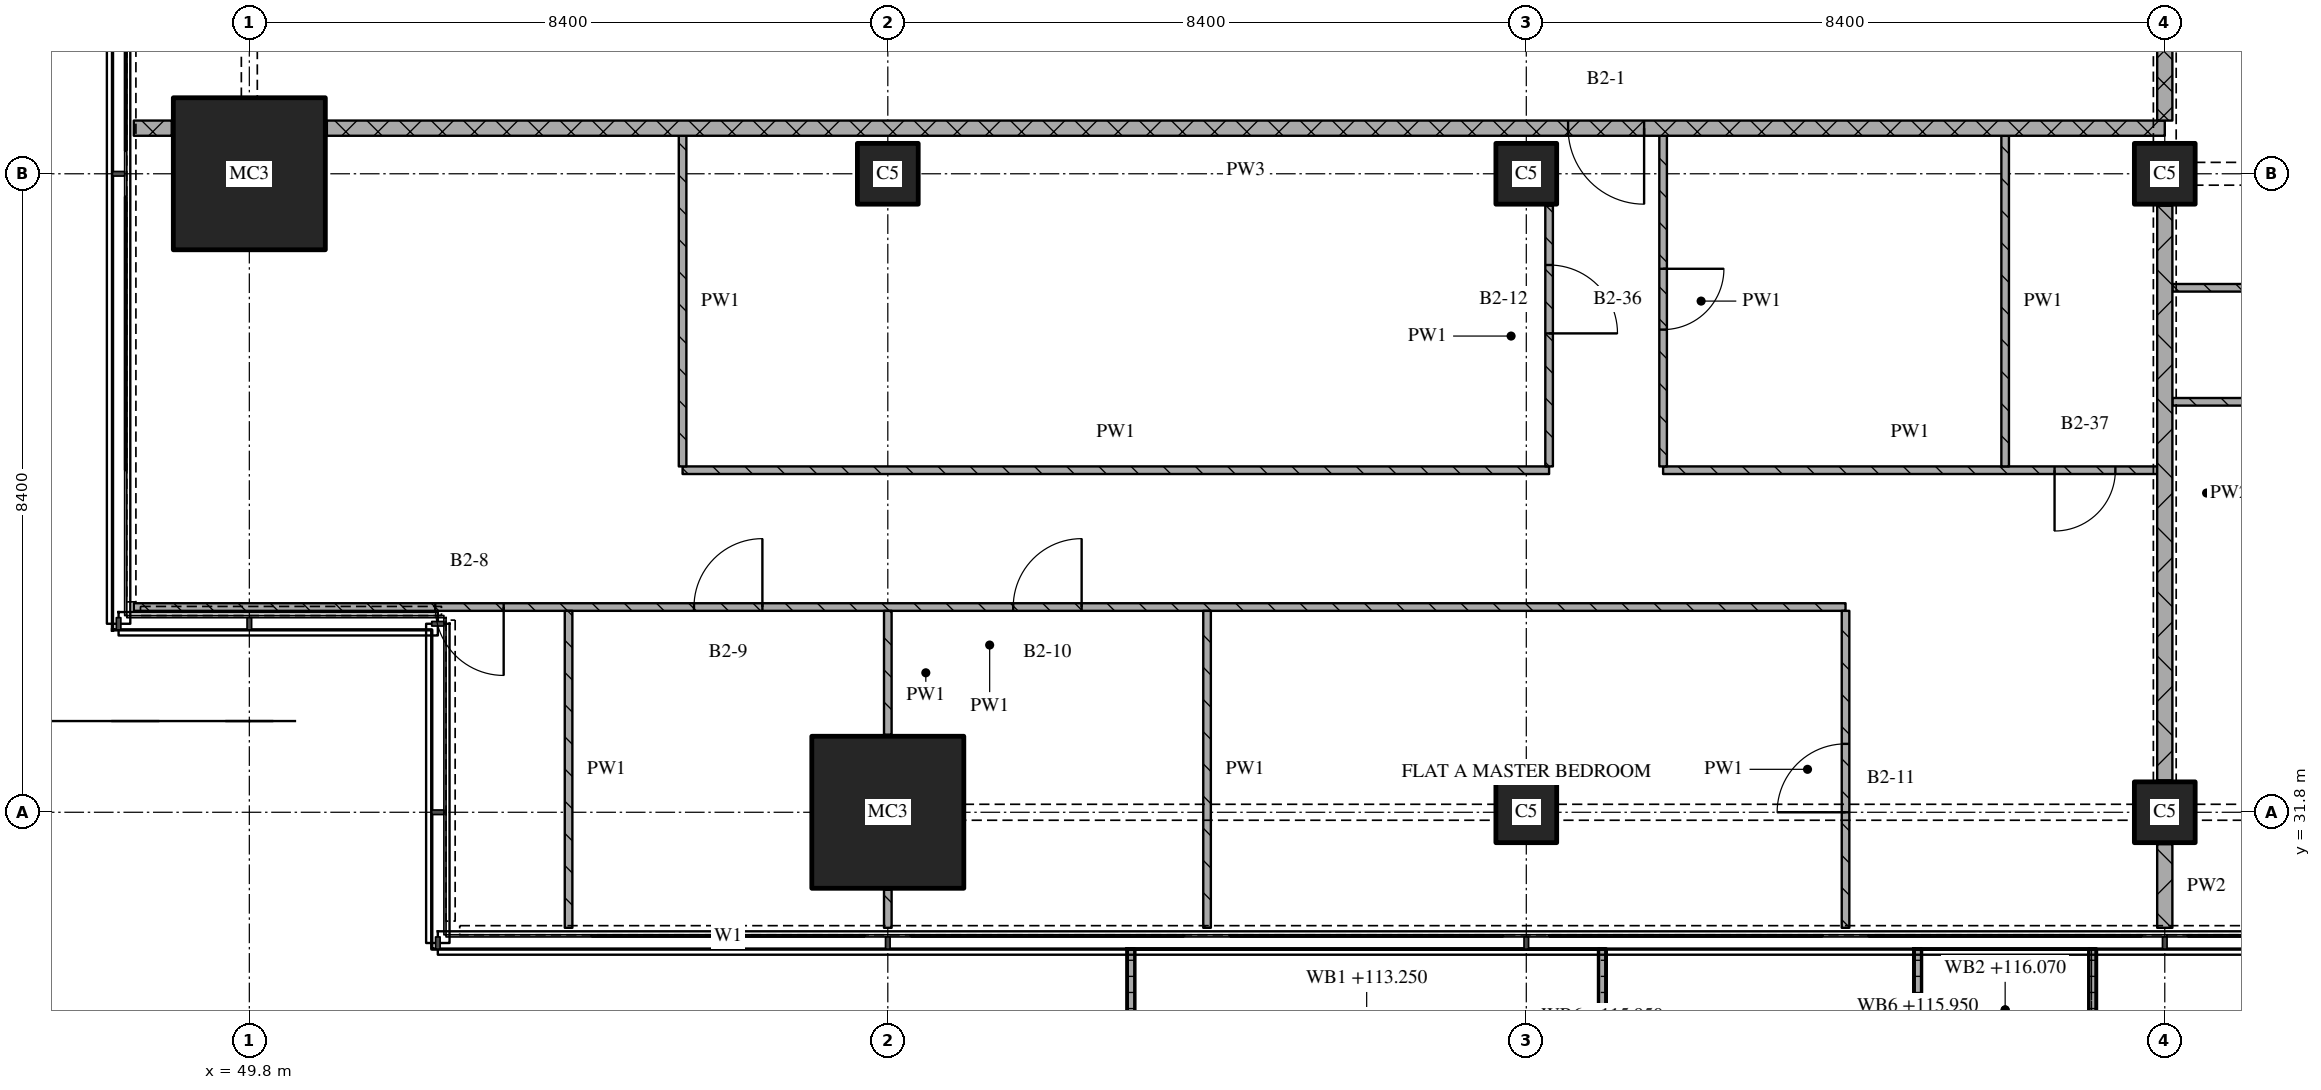
"""IFC4 building model, lengths in metres.
Left out: names, types, materials, properties, quantities, classifications, styles, units other than length and angle.
Written with IfcOpenShell. Run it as: python <this file> out.ifc"""

import sys

from ifc_helpers import new_model, si_unit, direction, frame, frame_2d, origin, origin_2d, place, context, subcontext, project, spatial, polyline, rectangle, outline, extrude, element, fill, save


model = new_model("IFC4")
c1 = context("Model", 3, precision=1e-05, world=origin(), true_north=direction((0.0, 1.0)))
c2 = subcontext(c1, "Body", "Model", "MODEL_VIEW")
j1 = project(units=[si_unit("LENGTHUNIT", "METRE"), si_unit("PLANEANGLEUNIT", "RADIAN")], contexts=[c1])
p1 = place(None, origin())
s1 = spatial("IfcSite", under=j1, at=p1, CompositionType="ELEMENT")
p2 = place(p1, origin())
s2 = spatial("IfcBuilding", under=s1, at=p2, CompositionType="ELEMENT")
p3 = place(p2, frame((0.0, 0.0, 113.25)))
s3 = spatial("IfcBuildingStorey", under=s2, at=p3, CompositionType="ELEMENT", Elevation=113.25)
for number, where, z_axis, x_axis in (
    (1, (49.8, 40.2, 0.0), (0.0, 0.0, 1.0), (1.0, 0.0, 0.0)),
    (2, (58.2, 31.8, 0.0), (0.0, 0.0, 1.0), (1.0, 0.0, 0.0)),
):
    element("IfcColumn", number, at=place(p3, frame(where, z_axis=z_axis, x_axis=x_axis)), inside=s3, PredefinedType="COLUMN", context=c2, shape_type="SweptSolid", body=[
        extrude(rectangle(XDim=2.0, YDim=2.0, at=origin_2d()), origin(), (0.0, 0.0, 1.0), 3.6),
    ])
for number, where, z_axis, x_axis in (
    (3, (58.2, 40.2, 0.0), (0.0, 0.0, 1.0), (1.0, 0.0, 0.0)),
    (4, (66.6, 31.8, 0.0), (0.0, 0.0, 1.0), (1.0, 0.0, 0.0)),
    (5, (66.6, 40.2, 0.0), (0.0, 0.0, 1.0), (1.0, 0.0, 0.0)),
    (6, (75.0, 31.8, 0.0), (0.0, 0.0, 1.0), (1.0, 0.0, 0.0)),
    (7, (75.0, 40.2, 0.0), (0.0, 0.0, 1.0), (1.0, 0.0, 0.0)),
):
    element("IfcColumn", number, at=place(p3, frame(where, z_axis=z_axis, x_axis=x_axis)), inside=s3, PredefinedType="COLUMN", context=c2, shape_type="SweptSolid", body=[
        extrude(rectangle(XDim=0.8, YDim=0.8, at=origin_2d()), origin(), (0.0, 0.0, 1.0), 3.6),
    ])
p4 = place(p3, origin())
e8 = element("IfcWall", 8, at=p4, inside=s3, PredefinedType="SOLIDWALL", context=c2, shape_type="SweptSolid", body=[
    extrude(outline(polyline([(61.35, 30.0), (61.45, 30.0), (61.45, 28.233), (67.55, 28.233), (67.55, 30.0), (67.65, 30.0), (67.65, 28.133), (61.35, 28.133), (61.35, 30.0)])), origin(), (0.0, 0.0, 1.0), 1.0),
])
p5 = place(p3, origin())
e9 = element("IfcWall", 9, at=p5, inside=s3, PredefinedType="SOLIDWALL", context=c2, shape_type="SweptSolid", body=[
    extrude(outline(polyline([(71.7, 30.0), (71.8, 30.0), (71.8, 28.5), (74.0, 28.5), (74.0, 30.0), (74.1, 30.0), (74.1, 28.4), (71.7, 28.4), (71.7, 30.0)])), origin(), (0.0, 0.0, 1.0), 1.0),
])
p6 = place(p3, frame((70.8, 34.5, 0.0), z_axis=(0.0, 0.0, 1.0), x_axis=(-1.0, 0.0, 0.0)))
e10 = element("IfcWall", 10, at=p6, inside=s3, PredefinedType="PARTITIONING", context=c2, shape_type="SweptSolid", body=[
    extrude(rectangle(XDim=22.52, YDim=0.1, at=frame_2d((11.26, 0.0))), origin(), (0.0, 0.0, 1.0), 3.32),
])
p7 = place(p6, frame((10.05, 0.0, 0.0)))
e11 = element("IfcOpeningElement", 11, at=p7, cuts=e10, PredefinedType="OPENING", context=c2, shape_type="SweptSolid", body=[
    extrude(rectangle(XDim=0.9, YDim=2.1, at=frame_2d((0.45, 1.05))), frame((0.0, 0.06, 0.0), z_axis=(0.0, -1.0, 0.0), x_axis=(1.0, 0.0, 0.0)), (0.0, 0.0, 1.0), 0.12),
])
p8 = place(p6, frame((14.25, 0.0, 0.0)))
e12 = element("IfcOpeningElement", 12, at=p8, cuts=e10, PredefinedType="OPENING", context=c2, shape_type="SweptSolid", body=[
    extrude(rectangle(XDim=0.9, YDim=2.1, at=frame_2d((0.45, 1.05))), frame((0.0, 0.06, 0.0), z_axis=(0.0, -1.0, 0.0), x_axis=(1.0, 0.0, 0.0)), (0.0, 0.0, 1.0), 0.12),
])
p9 = place(p6, frame((17.654, 0.0, 0.0)))
e13 = element("IfcOpeningElement", 13, at=p9, cuts=e10, PredefinedType="OPENING", context=c2, shape_type="SweptSolid", body=[
    extrude(rectangle(XDim=0.9, YDim=2.1, at=frame_2d((0.45, 1.05))), frame((0.0, 0.06, 0.0), z_axis=(0.0, -1.0, 0.0), x_axis=(1.0, 0.0, 0.0)), (0.0, 0.0, 1.0), 0.12),
])
p10 = place(p3, frame((55.5, 36.3, 0.0), z_axis=(0.0, 0.0, 1.0), x_axis=(1.0, 0.0, 0.0)))
e14 = element("IfcWall", 14, at=p10, inside=s3, PredefinedType="PARTITIONING", context=c2, shape_type="SweptSolid", body=[
    extrude(rectangle(XDim=11.4, YDim=0.1, at=frame_2d((5.7, 0.0))), origin(), (0.0, 0.0, 1.0), 3.32),
])
p11 = place(p3, frame((68.4, 36.3, 0.0), z_axis=(0.0, 0.0, 1.0), x_axis=(1.0, 0.0, 0.0)))
e15 = element("IfcWall", 15, at=p11, inside=s3, PredefinedType="PARTITIONING", context=c2, shape_type="SweptSolid", body=[
    extrude(rectangle(XDim=6.5, YDim=0.1, at=frame_2d((3.25, 0.0))), origin(), (0.0, 0.0, 1.0), 3.32),
])
p12 = place(p11, frame((5.15, 0.0, 0.0)))
e16 = element("IfcOpeningElement", 16, at=p12, cuts=e15, PredefinedType="OPENING", context=c2, shape_type="SweptSolid", body=[
    extrude(rectangle(XDim=0.8, YDim=2.1, at=frame_2d((0.4, 1.05))), frame((0.0, 0.06, 0.0), z_axis=(0.0, -1.0, 0.0), x_axis=(1.0, 0.0, 0.0)), (0.0, 0.0, 1.0), 0.12),
])
p13 = place(p3, frame((75.1, 37.2, 0.0), z_axis=(0.0, 0.0, 1.0), x_axis=(1.0, 0.0, 0.0)))
e17 = element("IfcWall", 17, at=p13, inside=s3, PredefinedType="PARTITIONING", context=c2, shape_type="SweptSolid", body=[
    extrude(rectangle(XDim=8.3, YDim=0.1, at=frame_2d((4.15, 0.0))), origin(), (0.0, 0.0, 1.0), 3.32),
])
p14 = place(p3, frame((75.1, 38.7, 0.0), z_axis=(0.0, 0.0, 1.0), x_axis=(1.0, 0.0, 0.0)))
e18 = element("IfcWall", 18, at=p14, inside=s3, PredefinedType="PARTITIONING", context=c2, shape_type="SweptSolid", body=[
    extrude(rectangle(XDim=11.0, YDim=0.1, at=frame_2d((5.5, 0.0))), origin(), (0.0, 0.0, 1.0), 3.32),
])
p15 = place(p14, frame((1.75, 0.0, 0.0)))
e19 = element("IfcOpeningElement", 19, at=p15, cuts=e18, PredefinedType="OPENING", context=c2, shape_type="SweptSolid", body=[
    extrude(rectangle(XDim=0.8, YDim=2.1, at=frame_2d((0.4, 1.05))), frame((0.0, 0.06, 0.0), z_axis=(0.0, -1.0, 0.0), x_axis=(1.0, 0.0, 0.0)), (0.0, 0.0, 1.0), 0.12),
])
p16 = place(p14, frame((6.25, 0.0, 0.0)))
e20 = element("IfcOpeningElement", 20, at=p16, cuts=e18, PredefinedType="OPENING", context=c2, shape_type="SweptSolid", body=[
    extrude(rectangle(XDim=0.8, YDim=2.1, at=frame_2d((0.4, 1.05))), frame((0.0, 0.06, 0.0), z_axis=(0.0, -1.0, 0.0), x_axis=(1.0, 0.0, 0.0)), (0.0, 0.0, 1.0), 0.12),
])
p17 = place(p3, frame((48.28, 40.8, 0.0), z_axis=(0.0, 0.0, 1.0), x_axis=(1.0, 0.0, 0.0)))
e21 = element("IfcWall", 21, at=p17, inside=s3, PredefinedType="PARTITIONING", context=c2, shape_type="SweptSolid", body=[
    extrude(rectangle(XDim=0.5, YDim=0.2, at=frame_2d((0.25, 0.0))), origin(), (0.0, 0.0, 1.0), 3.32),
])
p18 = place(p3, frame((75.0, 40.8, 0.0), z_axis=(0.0, 0.0, 1.0), x_axis=(-1.0, 0.0, 0.0)))
e22 = element("IfcWall", 22, at=p18, inside=s3, PredefinedType="PARTITIONING", context=c2, shape_type="SweptSolid", body=[
    extrude(rectangle(XDim=24.18, YDim=0.2, at=frame_2d((12.09, 0.0))), origin(), (0.0, 0.0, 1.0), 3.32),
])
p19 = place(p18, frame((6.85, 0.0, 0.0)))
e23 = element("IfcOpeningElement", 23, at=p19, cuts=e22, PredefinedType="OPENING", context=c2, shape_type="SweptSolid", body=[
    extrude(rectangle(XDim=1.0, YDim=2.1, at=frame_2d((0.5, 1.05))), frame((0.0, 0.11, 0.0), z_axis=(0.0, -1.0, 0.0), x_axis=(1.0, 0.0, 0.0)), (0.0, 0.0, 1.0), 0.22),
])
p20 = place(p3, frame((54.0, 34.45, 0.0), z_axis=(0.0, 0.0, 1.0), x_axis=(0.0, -1.0, 0.0)))
e24 = element("IfcWall", 24, at=p20, inside=s3, PredefinedType="PARTITIONING", context=c2, shape_type="SweptSolid", body=[
    extrude(rectangle(XDim=4.17, YDim=0.1, at=frame_2d((2.085, 0.0))), origin(), (0.0, 0.0, 1.0), 3.32),
])
p21 = place(p3, frame((55.5, 40.7, 0.0), z_axis=(0.0, 0.0, 1.0), x_axis=(0.0, -1.0, 0.0)))
e25 = element("IfcWall", 25, at=p21, inside=s3, PredefinedType="PARTITIONING", context=c2, shape_type="SweptSolid", body=[
    extrude(rectangle(XDim=4.35, YDim=0.1, at=frame_2d((2.175, 0.0))), origin(), (0.0, 0.0, 1.0), 3.32),
])
p22 = place(p3, frame((58.2, 30.78, 0.0), z_axis=(0.0, 0.0, 1.0), x_axis=(0.0, -1.0, 0.0)))
e26 = element("IfcWall", 26, at=p22, inside=s3, PredefinedType="PARTITIONING", context=c2, shape_type="SweptSolid", body=[
    extrude(rectangle(XDim=0.5, YDim=0.1, at=frame_2d((0.25, 0.0))), origin(), (0.0, 0.0, 1.0), 3.32),
])
p23 = place(p3, frame((58.2, 34.45, 0.0), z_axis=(0.0, 0.0, 1.0), x_axis=(0.0, -1.0, 0.0)))
e27 = element("IfcWall", 27, at=p23, inside=s3, PredefinedType="PARTITIONING", context=c2, shape_type="SweptSolid", body=[
    extrude(rectangle(XDim=1.63, YDim=0.1, at=frame_2d((0.815, 0.0))), origin(), (0.0, 0.0, 1.0), 3.32),
])
p24 = place(p3, frame((62.4, 34.45, 0.0), z_axis=(0.0, 0.0, 1.0), x_axis=(0.0, -1.0, 0.0)))
e28 = element("IfcWall", 28, at=p24, inside=s3, PredefinedType="PARTITIONING", context=c2, shape_type="SweptSolid", body=[
    extrude(rectangle(XDim=4.17, YDim=0.1, at=frame_2d((2.085, 0.0))), origin(), (0.0, 0.0, 1.0), 3.32),
])
p25 = place(p3, frame((66.9, 36.35, 0.0), z_axis=(0.0, 0.0, 1.0), x_axis=(0.0, 1.0, 0.0)))
e29 = element("IfcWall", 29, at=p25, inside=s3, PredefinedType="PARTITIONING", context=c2, shape_type="SweptSolid", body=[
    extrude(rectangle(XDim=3.43, YDim=0.1, at=frame_2d((1.715, 0.0))), origin(), (0.0, 0.0, 1.0), 3.32),
])
p26 = place(p25, frame((1.75, 0.0, 0.0)))
e30 = element("IfcOpeningElement", 30, at=p26, cuts=e29, PredefinedType="OPENING", context=c2, shape_type="SweptSolid", body=[
    extrude(rectangle(XDim=0.9, YDim=2.1, at=frame_2d((0.45, 1.05))), frame((0.0, 0.06, 0.0), z_axis=(0.0, -1.0, 0.0), x_axis=(1.0, 0.0, 0.0)), (0.0, 0.0, 1.0), 0.12),
])
p27 = place(p3, frame((68.4, 40.7, 0.0), z_axis=(0.0, 0.0, 1.0), x_axis=(0.0, -1.0, 0.0)))
e31 = element("IfcWall", 31, at=p27, inside=s3, PredefinedType="PARTITIONING", context=c2, shape_type="SweptSolid", body=[
    extrude(rectangle(XDim=4.35, YDim=0.1, at=frame_2d((2.175, 0.0))), origin(), (0.0, 0.0, 1.0), 3.32),
])
p28 = place(p27, frame((1.75, 0.0, 0.0)))
e32 = element("IfcOpeningElement", 32, at=p28, cuts=e31, PredefinedType="OPENING", context=c2, shape_type="SweptSolid", body=[
    extrude(rectangle(XDim=0.8, YDim=2.1, at=frame_2d((0.4, 1.05))), frame((0.0, 0.06, 0.0), z_axis=(0.0, -1.0, 0.0), x_axis=(1.0, 0.0, 0.0)), (0.0, 0.0, 1.0), 0.12),
])
p29 = place(p3, frame((70.8, 30.28, 0.0), z_axis=(0.0, 0.0, 1.0), x_axis=(0.0, 1.0, 0.0)))
e33 = element("IfcWall", 33, at=p29, inside=s3, PredefinedType="PARTITIONING", context=c2, shape_type="SweptSolid", body=[
    extrude(rectangle(XDim=4.17, YDim=0.1, at=frame_2d((2.085, 0.0))), origin(), (0.0, 0.0, 1.0), 3.32),
])
p30 = place(p29, frame((1.52, 0.0, 0.0)))
e34 = element("IfcOpeningElement", 34, at=p30, cuts=e33, PredefinedType="OPENING", context=c2, shape_type="SweptSolid", body=[
    extrude(rectangle(XDim=0.9, YDim=2.1, at=frame_2d((0.45, 1.05))), frame((0.0, 0.06, 0.0), z_axis=(0.0, -1.0, 0.0), x_axis=(1.0, 0.0, 0.0)), (0.0, 0.0, 1.0), 0.12),
])
p31 = place(p3, frame((72.9, 40.7, 0.0), z_axis=(0.0, 0.0, 1.0), x_axis=(0.0, -1.0, 0.0)))
e35 = element("IfcWall", 35, at=p31, inside=s3, PredefinedType="PARTITIONING", context=c2, shape_type="SweptSolid", body=[
    extrude(rectangle(XDim=4.35, YDim=0.1, at=frame_2d((2.175, 0.0))), origin(), (0.0, 0.0, 1.0), 3.32),
])
p32 = place(p3, frame((75.0, 43.1, 0.0), z_axis=(0.0, 0.0, 1.0), x_axis=(0.0, -1.0, 0.0)))
e36 = element("IfcWall", 36, at=p32, inside=s3, PredefinedType="PARTITIONING", context=c2, shape_type="SweptSolid", body=[
    extrude(rectangle(XDim=2.2, YDim=0.2, at=frame_2d((1.1, 0.0))), origin(), (0.0, 0.0, 1.0), 2.43),
])
p33 = place(p3, frame((75.0, 31.38, 0.0), z_axis=(0.0, 0.0, 1.0), x_axis=(0.0, -1.0, 0.0)))
e37 = element("IfcWall", 37, at=p33, inside=s3, PredefinedType="PARTITIONING", context=c2, shape_type="SweptSolid", body=[
    extrude(rectangle(XDim=1.1, YDim=0.2, at=frame_2d((0.55, 0.0))), origin(), (0.0, 0.0, 1.0), 3.32),
])
p34 = place(p3, frame((75.0, 39.78, 0.0), z_axis=(0.0, 0.0, 1.0), x_axis=(0.0, -1.0, 0.0)))
e38 = element("IfcWall", 38, at=p34, inside=s3, PredefinedType="PARTITIONING", context=c2, shape_type="SweptSolid", body=[
    extrude(rectangle(XDim=7.56, YDim=0.2, at=frame_2d((3.78, 0.0))), origin(), (0.0, 0.0, 1.0), 2.83),
])
p35 = place(p7, origin())
e39 = element("IfcDoor", 39, at=p35, inside=s3, OperationType="SINGLE_SWING_RIGHT", PredefinedType="DOOR", context=c2, shape_type="SweptSolid", body=[
    extrude(rectangle(XDim=0.9, YDim=2.1, at=frame_2d((0.45, 1.05))), frame((0.0, 0.025, 0.0), z_axis=(0.0, -1.0, 0.0), x_axis=(1.0, 0.0, 0.0)), (0.0, 0.0, 1.0), 0.05),
])
fill(e11, e39)
p36 = place(p8, origin())
e40 = element("IfcDoor", 40, at=p36, inside=s3, OperationType="SINGLE_SWING_RIGHT", PredefinedType="DOOR", context=c2, shape_type="SweptSolid", body=[
    extrude(rectangle(XDim=0.9, YDim=2.1, at=frame_2d((0.45, 1.05))), frame((0.0, 0.025, 0.0), z_axis=(0.0, -1.0, 0.0), x_axis=(1.0, 0.0, 0.0)), (0.0, 0.0, 1.0), 0.05),
])
fill(e12, e40)
p37 = place(p9, origin())
e41 = element("IfcDoor", 41, at=p37, inside=s3, OperationType="SINGLE_SWING_LEFT", PredefinedType="DOOR", context=c2, shape_type="SweptSolid", body=[
    extrude(rectangle(XDim=0.9, YDim=2.1, at=frame_2d((0.45, 1.05))), frame((0.0, 0.025, 0.0), z_axis=(0.0, -1.0, 0.0), x_axis=(1.0, 0.0, 0.0)), (0.0, 0.0, 1.0), 0.05),
])
fill(e13, e41)
p38 = place(p12, origin())
e42 = element("IfcDoor", 42, at=p38, inside=s3, OperationType="SINGLE_SWING_RIGHT", PredefinedType="DOOR", context=c2, shape_type="SweptSolid", body=[
    extrude(rectangle(XDim=0.8, YDim=2.1, at=frame_2d((0.4, 1.05))), frame((0.0, 0.025, 0.0), z_axis=(0.0, -1.0, 0.0), x_axis=(1.0, 0.0, 0.0)), (0.0, 0.0, 1.0), 0.05),
])
fill(e16, e42)
p39 = place(p19, origin())
e43 = element("IfcDoor", 43, at=p39, inside=s3, OperationType="SINGLE_SWING_LEFT", PredefinedType="DOOR", context=c2, shape_type="SweptSolid", body=[
    extrude(rectangle(XDim=1.0, YDim=2.1, at=frame_2d((0.5, 1.05))), frame((0.0, 0.025, 0.0), z_axis=(0.0, -1.0, 0.0), x_axis=(1.0, 0.0, 0.0)), (0.0, 0.0, 1.0), 0.05),
])
fill(e23, e43)
p40 = place(p26, origin())
e44 = element("IfcDoor", 44, at=p40, inside=s3, OperationType="SINGLE_SWING_RIGHT", PredefinedType="DOOR", context=c2, shape_type="SweptSolid", body=[
    extrude(rectangle(XDim=0.9, YDim=2.1, at=frame_2d((0.45, 1.05))), frame((0.0, 0.025, 0.0), z_axis=(0.0, -1.0, 0.0), x_axis=(1.0, 0.0, 0.0)), (0.0, 0.0, 1.0), 0.05),
])
fill(e30, e44)
p41 = place(p28, origin())
e45 = element("IfcDoor", 45, at=p41, inside=s3, OperationType="SINGLE_SWING_LEFT", PredefinedType="DOOR", context=c2, shape_type="SweptSolid", body=[
    extrude(rectangle(XDim=0.8, YDim=2.1, at=frame_2d((0.4, 1.05))), frame((0.0, 0.025, 0.0), z_axis=(0.0, -1.0, 0.0), x_axis=(1.0, 0.0, 0.0)), (0.0, 0.0, 1.0), 0.05),
])
fill(e32, e45)
p42 = place(p30, origin())
e46 = element("IfcDoor", 46, at=p42, inside=s3, OperationType="SINGLE_SWING_LEFT", PredefinedType="DOOR", context=c2, shape_type="SweptSolid", body=[
    extrude(rectangle(XDim=0.9, YDim=2.1, at=frame_2d((0.45, 1.05))), frame((0.0, 0.025, 0.0), z_axis=(0.0, -1.0, 0.0), x_axis=(1.0, 0.0, 0.0)), (0.0, 0.0, 1.0), 0.05),
])
fill(e34, e46)
save(model, sys.argv[1])
